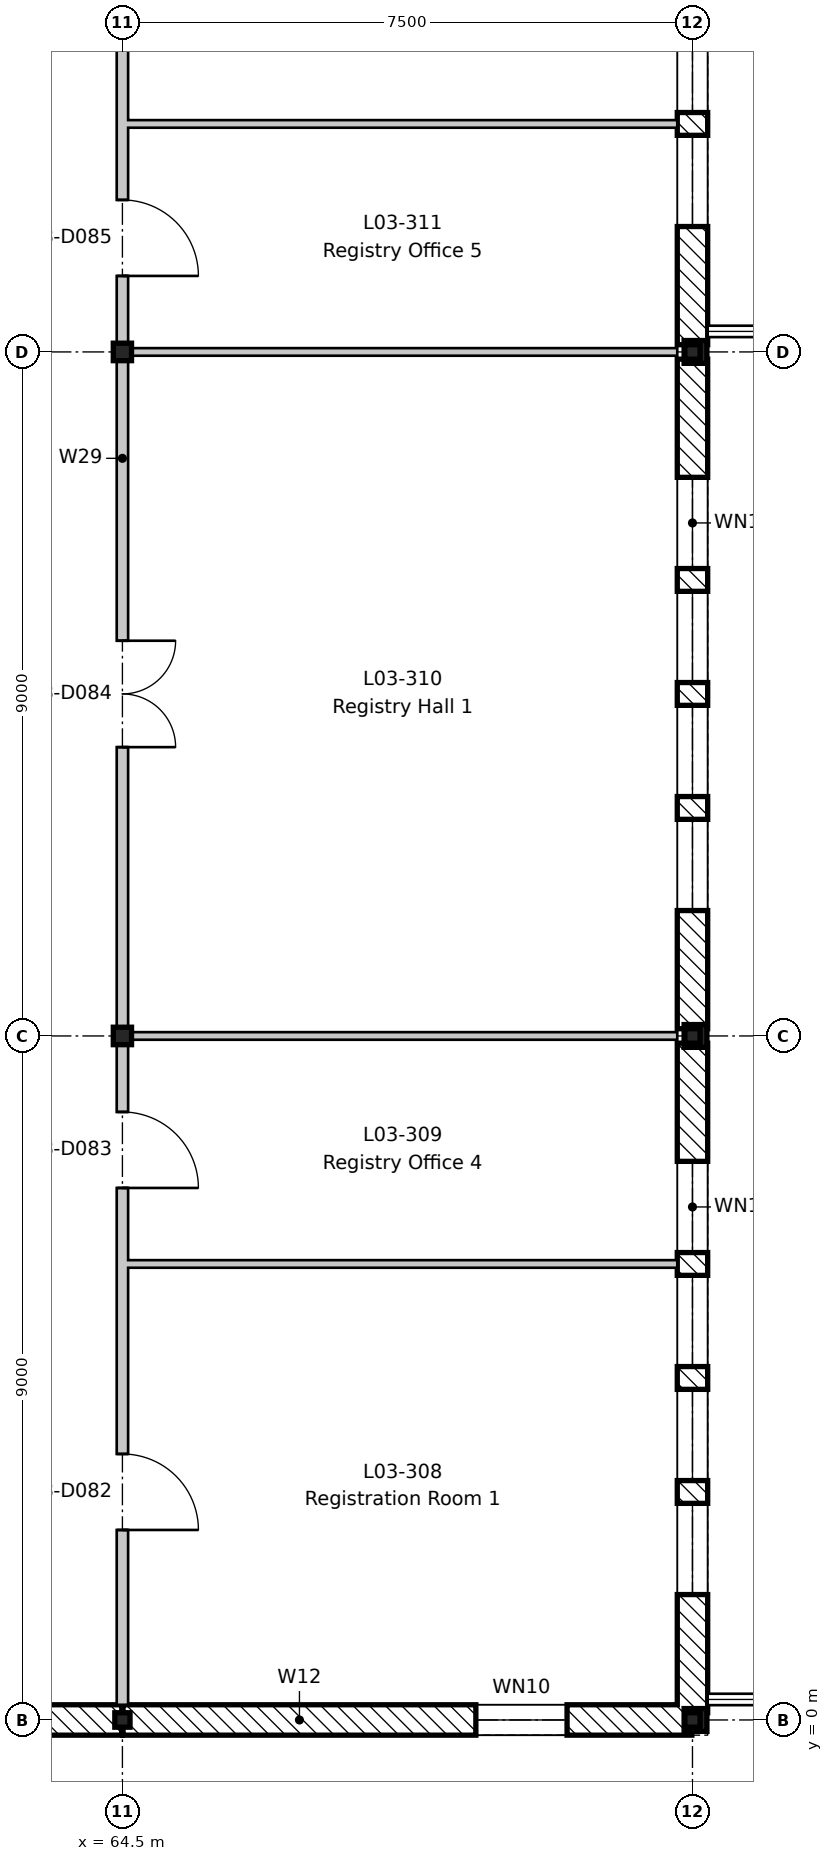
"""IFC4 building model, lengths in metres.
Left out: names, types, materials, properties, quantities, classifications, styles, units other than length and angle.
Written with IfcOpenShell. Run it as: python <this file> out.ifc"""

import sys

from ifc_helpers import new_model, si_unit, direction, frame, frame_2d, origin, origin_2d, place, context, subcontext, project, spatial, rectangle, i_section, extrude, element, fill, save


model = new_model("IFC4")
c1 = context("Model", 3, precision=1e-05, world=origin(), true_north=direction((0.0, 1.0)))
c2 = subcontext(c1, "Body", "Model", "MODEL_VIEW")
j1 = project(units=[si_unit("LENGTHUNIT", "METRE"), si_unit("PLANEANGLEUNIT", "RADIAN")], contexts=[c1])
p1 = place(None, origin())
s1 = spatial("IfcSite", under=j1, at=p1, CompositionType="ELEMENT")
p2 = place(p1, origin())
s2 = spatial("IfcBuilding", under=s1, at=p2, CompositionType="ELEMENT")
p3 = place(p2, frame((0.0, 0.0, 14.4)))
s3 = spatial("IfcBuildingStorey", under=s2, at=p3, CompositionType="ELEMENT", Elevation=14.4)
p4 = place(p3, frame((64.5, 0.0, -0.2), z_axis=(0.0, 0.0, 1.0), x_axis=(1.0, 0.0, 0.0)))
e1 = element("IfcColumn", 1, at=p4, inside=s3, PredefinedType="COLUMN", context=c2, shape_type="SweptSolid", body=[
    extrude(i_section(OverallWidth=0.2, OverallDepth=0.19, WebThickness=0.007, FlangeThickness=0.01, FilletRadius=0.018, at=origin_2d()), origin(), (0.0, 0.0, 1.0), 4.15),
])
for number, where, z_axis, x_axis in (
    (2, (64.5, 9.0, -0.2), (0.0, 0.0, 1.0), (1.0, 0.0, 0.0)),
    (3, (64.5, 18.0, -0.2), (0.0, 0.0, 1.0), (1.0, 0.0, 0.0)),
):
    element("IfcColumn", number, at=place(p3, frame(where, z_axis=z_axis, x_axis=x_axis)), inside=s3, PredefinedType="COLUMN", context=c2, shape_type="SweptSolid", body=[
        extrude(i_section(OverallWidth=0.24, OverallDepth=0.23, WebThickness=0.008, FlangeThickness=0.012, FilletRadius=0.021, at=origin_2d()), origin(), (0.0, 0.0, 1.0), 4.15),
    ])
for number, where, z_axis, x_axis in (
    (4, (72.0, 0.0, -0.2), (0.0, 0.0, 1.0), (1.0, 0.0, 0.0)),
    (5, (72.0, 9.0, -0.2), (0.0, 0.0, 1.0), (1.0, 0.0, 0.0)),
    (6, (72.0, 18.0, -0.2), (0.0, 0.0, 1.0), (1.0, 0.0, 0.0)),
):
    element("IfcColumn", number, at=place(p3, frame(where, z_axis=z_axis, x_axis=x_axis)), inside=s3, PredefinedType="COLUMN", context=c2, shape_type="SweptSolid", body=[
        extrude(i_section(OverallWidth=0.2, OverallDepth=0.19, WebThickness=0.007, FlangeThickness=0.01, FilletRadius=0.018, at=origin_2d()), origin(), (0.0, 0.0, 1.0), 4.15),
    ])
for number, where, z_axis, x_axis in (
    (7, (72.04, 0.0, 3.95), (0.0, 0.0, 1.0), (1.0, 0.0, 0.0)),
    (8, (72.04, 9.0, 3.95), (0.0, 0.0, 1.0), (1.0, 0.0, 0.0)),
    (9, (72.04, 18.0, 3.95), (0.0, 0.0, 1.0), (1.0, 0.0, 0.0)),
):
    element("IfcColumn", number, at=place(p3, frame(where, z_axis=z_axis, x_axis=x_axis)), inside=s3, PredefinedType="COLUMN", context=c2, shape_type="SweptSolid", body=[
        extrude(i_section(OverallWidth=0.3, OverallDepth=0.3, WebThickness=0.011, FlangeThickness=0.019, FilletRadius=0.027, at=origin_2d()), origin(), (0.0, 0.0, 1.0), 0.25),
    ])
p5 = place(p3, frame((72.0, 8.905, 0.0), z_axis=(0.0, 0.0, 1.0), x_axis=(0.0, -1.0, 0.0)))
e10 = element("IfcWall", 10, at=p5, inside=s3, PredefinedType="STANDARD", context=c2, shape_type="SweptSolid", body=[
    extrude(rectangle(XDim=8.81, YDim=0.4, at=frame_2d((4.405, 0.0))), origin(), (0.0, 0.0, 1.0), 3.55),
])
p6 = place(p5, frame((6.055, 0.0, 0.6)))
e11 = element("IfcOpeningElement", 11, at=p6, cuts=e10, PredefinedType="OPENING", context=c2, shape_type="SweptSolid", body=[
    extrude(rectangle(XDim=1.2, YDim=1.8, at=frame_2d((0.6, 0.9))), frame((0.0, 0.21, 0.0), z_axis=(0.0, -1.0, 0.0), x_axis=(1.0, 0.0, 0.0)), (0.0, 0.0, 1.0), 0.42),
])
p7 = place(p5, frame((4.555, 0.0, 0.6)))
e12 = element("IfcOpeningElement", 12, at=p7, cuts=e10, PredefinedType="OPENING", context=c2, shape_type="SweptSolid", body=[
    extrude(rectangle(XDim=1.2, YDim=1.8, at=frame_2d((0.6, 0.9))), frame((0.0, 0.21, 0.0), z_axis=(0.0, -1.0, 0.0), x_axis=(1.0, 0.0, 0.0)), (0.0, 0.0, 1.0), 0.42),
])
p8 = place(p5, frame((3.055, 0.0, 0.6)))
e13 = element("IfcOpeningElement", 13, at=p8, cuts=e10, PredefinedType="OPENING", context=c2, shape_type="SweptSolid", body=[
    extrude(rectangle(XDim=1.2, YDim=1.8, at=frame_2d((0.6, 0.9))), frame((0.0, 0.21, 0.0), z_axis=(0.0, -1.0, 0.0), x_axis=(1.0, 0.0, 0.0)), (0.0, 0.0, 1.0), 0.42),
])
p9 = place(p5, frame((1.555, 0.0, 0.6)))
e14 = element("IfcOpeningElement", 14, at=p9, cuts=e10, PredefinedType="OPENING", context=c2, shape_type="SweptSolid", body=[
    extrude(rectangle(XDim=1.2, YDim=1.8, at=frame_2d((0.6, 0.9))), frame((0.0, 0.21, 0.0), z_axis=(0.0, -1.0, 0.0), x_axis=(1.0, 0.0, 0.0)), (0.0, 0.0, 1.0), 0.42),
])
p10 = place(p3, frame((72.0, 17.905, 0.0), z_axis=(0.0, 0.0, 1.0), x_axis=(0.0, -1.0, 0.0)))
e15 = element("IfcWall", 15, at=p10, inside=s3, PredefinedType="STANDARD", context=c2, shape_type="SweptSolid", body=[
    extrude(rectangle(XDim=8.81, YDim=0.4, at=frame_2d((4.405, 0.0))), origin(), (0.0, 0.0, 1.0), 3.55),
])
p11 = place(p10, frame((6.055, 0.0, 0.6)))
e16 = element("IfcOpeningElement", 16, at=p11, cuts=e15, PredefinedType="OPENING", context=c2, shape_type="SweptSolid", body=[
    extrude(rectangle(XDim=1.2, YDim=1.8, at=frame_2d((0.6, 0.9))), frame((0.0, 0.21, 0.0), z_axis=(0.0, -1.0, 0.0), x_axis=(1.0, 0.0, 0.0)), (0.0, 0.0, 1.0), 0.42),
])
p12 = place(p10, frame((4.555, 0.0, 0.6)))
e17 = element("IfcOpeningElement", 17, at=p12, cuts=e15, PredefinedType="OPENING", context=c2, shape_type="SweptSolid", body=[
    extrude(rectangle(XDim=1.2, YDim=1.8, at=frame_2d((0.6, 0.9))), frame((0.0, 0.21, 0.0), z_axis=(0.0, -1.0, 0.0), x_axis=(1.0, 0.0, 0.0)), (0.0, 0.0, 1.0), 0.42),
])
p13 = place(p10, frame((3.055, 0.0, 0.6)))
e18 = element("IfcOpeningElement", 18, at=p13, cuts=e15, PredefinedType="OPENING", context=c2, shape_type="SweptSolid", body=[
    extrude(rectangle(XDim=1.2, YDim=1.8, at=frame_2d((0.6, 0.9))), frame((0.0, 0.21, 0.0), z_axis=(0.0, -1.0, 0.0), x_axis=(1.0, 0.0, 0.0)), (0.0, 0.0, 1.0), 0.42),
])
p14 = place(p10, frame((1.555, 0.0, 0.6)))
e19 = element("IfcOpeningElement", 19, at=p14, cuts=e15, PredefinedType="OPENING", context=c2, shape_type="SweptSolid", body=[
    extrude(rectangle(XDim=1.2, YDim=1.8, at=frame_2d((0.6, 0.9))), frame((0.0, 0.21, 0.0), z_axis=(0.0, -1.0, 0.0), x_axis=(1.0, 0.0, 0.0)), (0.0, 0.0, 1.0), 0.42),
])
p15 = place(p3, frame((72.0, 26.905, 0.0), z_axis=(0.0, 0.0, 1.0), x_axis=(0.0, -1.0, 0.0)))
e20 = element("IfcWall", 20, at=p15, inside=s3, PredefinedType="STANDARD", context=c2, shape_type="SweptSolid", body=[
    extrude(rectangle(XDim=8.81, YDim=0.4, at=frame_2d((4.405, 0.0))), origin(), (0.0, 0.0, 1.0), 3.55),
])
p16 = place(p15, frame((6.055, 0.0, 0.6)))
e21 = element("IfcOpeningElement", 21, at=p16, cuts=e20, PredefinedType="OPENING", context=c2, shape_type="SweptSolid", body=[
    extrude(rectangle(XDim=1.2, YDim=1.8, at=frame_2d((0.6, 0.9))), frame((0.0, 0.21, 0.0), z_axis=(0.0, -1.0, 0.0), x_axis=(1.0, 0.0, 0.0)), (0.0, 0.0, 1.0), 0.42),
])
p17 = place(p15, frame((4.555, 0.0, 0.6)))
e22 = element("IfcOpeningElement", 22, at=p17, cuts=e20, PredefinedType="OPENING", context=c2, shape_type="SweptSolid", body=[
    extrude(rectangle(XDim=1.2, YDim=1.8, at=frame_2d((0.6, 0.9))), frame((0.0, 0.21, 0.0), z_axis=(0.0, -1.0, 0.0), x_axis=(1.0, 0.0, 0.0)), (0.0, 0.0, 1.0), 0.42),
])
p18 = place(p15, frame((3.055, 0.0, 0.6)))
e23 = element("IfcOpeningElement", 23, at=p18, cuts=e20, PredefinedType="OPENING", context=c2, shape_type="SweptSolid", body=[
    extrude(rectangle(XDim=1.2, YDim=1.8, at=frame_2d((0.6, 0.9))), frame((0.0, 0.21, 0.0), z_axis=(0.0, -1.0, 0.0), x_axis=(1.0, 0.0, 0.0)), (0.0, 0.0, 1.0), 0.42),
])
p19 = place(p15, frame((1.555, 0.0, 0.6)))
e24 = element("IfcOpeningElement", 24, at=p19, cuts=e20, PredefinedType="OPENING", context=c2, shape_type="SweptSolid", body=[
    extrude(rectangle(XDim=1.2, YDim=1.8, at=frame_2d((0.6, 0.9))), frame((0.0, 0.21, 0.0), z_axis=(0.0, -1.0, 0.0), x_axis=(1.0, 0.0, 0.0)), (0.0, 0.0, 1.0), 0.42),
])
p20 = place(p3, frame((64.492, 0.0, 0.0), z_axis=(0.0, 0.0, 1.0), x_axis=(-1.0, 0.0, 0.0)))
e25 = element("IfcWall", 25, at=p20, inside=s3, PredefinedType="STANDARD", context=c2, shape_type="SweptSolid", body=[
    extrude(rectangle(XDim=2.983, YDim=0.4, at=frame_2d((1.492, 0.0))), origin(), (0.0, 0.0, 1.0), 3.75),
])
p21 = place(p3, frame((71.992, 0.0, 0.0), z_axis=(0.0, 0.0, 1.0), x_axis=(-1.0, 0.0, 0.0)))
e26 = element("IfcWall", 26, at=p21, inside=s3, PredefinedType="STANDARD", context=c2, shape_type="SweptSolid", body=[
    extrude(rectangle(XDim=7.483, YDim=0.4, at=frame_2d((3.742, 0.0))), origin(), (0.0, 0.0, 1.0), 3.62),
])
p22 = place(p21, frame((1.642, 0.0, 0.6)))
e27 = element("IfcOpeningElement", 27, at=p22, cuts=e26, PredefinedType="OPENING", context=c2, shape_type="SweptSolid", body=[
    extrude(rectangle(XDim=1.2, YDim=1.8, at=frame_2d((0.6, 0.9))), frame((0.0, 0.21, 0.0), z_axis=(0.0, -1.0, 0.0), x_axis=(1.0, 0.0, 0.0)), (0.0, 0.0, 1.0), 0.42),
])
p23 = place(p3, frame((64.575, 6.0, 0.0), z_axis=(0.0, 0.0, 1.0), x_axis=(1.0, 0.0, 0.0)))
e28 = element("IfcWall", 28, at=p23, inside=s3, PredefinedType="PARTITIONING", context=c2, shape_type="SweptSolid", body=[
    extrude(rectangle(XDim=7.225, YDim=0.1, at=frame_2d((3.613, 0.0))), origin(), (0.0, 0.0, 1.0), 3.95),
])
for number, where, z_axis, x_axis in (
    (29, (64.575, 9.0, 0.0), (0.0, 0.0, 1.0), (1.0, 0.0, 0.0)),
    (30, (64.575, 18.0, 0.0), (0.0, 0.0, 1.0), (1.0, 0.0, 0.0)),
):
    element("IfcWall", number, at=place(p3, frame(where, z_axis=z_axis, x_axis=x_axis)), inside=s3, PredefinedType="PARTITIONING", context=c2, shape_type="SweptSolid", body=[
        extrude(rectangle(XDim=7.225, YDim=0.1, at=frame_2d((3.613, 0.0))), origin(), (0.0, 0.0, 1.0), 3.6),
    ])
p24 = place(p3, frame((64.575, 21.0, 0.0), z_axis=(0.0, 0.0, 1.0), x_axis=(1.0, 0.0, 0.0)))
e31 = element("IfcWall", 31, at=p24, inside=s3, PredefinedType="PARTITIONING", context=c2, shape_type="SweptSolid", body=[
    extrude(rectangle(XDim=7.225, YDim=0.1, at=frame_2d((3.613, 0.0))), origin(), (0.0, 0.0, 1.0), 3.95),
])
p25 = place(p3, frame((64.5, 0.2, 0.0), z_axis=(0.0, 0.0, 1.0), x_axis=(0.0, 1.0, 0.0)))
e32 = element("IfcWall", 32, at=p25, inside=s3, PredefinedType="PARTITIONING", context=c2, shape_type="SweptSolid", body=[
    extrude(rectangle(XDim=53.6, YDim=0.15, at=frame_2d((26.8, 0.0))), origin(), (0.0, 0.0, 1.0), 3.43),
])
p26 = place(p25, frame((2.3, 0.0, 0.0)))
e33 = element("IfcOpeningElement", 33, at=p26, cuts=e32, PredefinedType="OPENING", context=c2, shape_type="SweptSolid", body=[
    extrude(rectangle(XDim=1.0, YDim=2.1, at=frame_2d((0.5, 1.05))), frame((0.0, 0.085, 0.0), z_axis=(0.0, -1.0, 0.0), x_axis=(1.0, 0.0, 0.0)), (0.0, 0.0, 1.0), 0.17),
])
p27 = place(p25, frame((6.8, 0.0, 0.0)))
e34 = element("IfcOpeningElement", 34, at=p27, cuts=e32, PredefinedType="OPENING", context=c2, shape_type="SweptSolid", body=[
    extrude(rectangle(XDim=1.0, YDim=2.1, at=frame_2d((0.5, 1.05))), frame((0.0, 0.085, 0.0), z_axis=(0.0, -1.0, 0.0), x_axis=(1.0, 0.0, 0.0)), (0.0, 0.0, 1.0), 0.17),
])
p28 = place(p25, frame((12.6, 0.0, 0.0)))
e35 = element("IfcOpeningElement", 35, at=p28, cuts=e32, PredefinedType="OPENING", context=c2, shape_type="SweptSolid", body=[
    extrude(rectangle(XDim=1.4, YDim=2.1, at=frame_2d((0.7, 1.05))), frame((0.0, 0.085, 0.0), z_axis=(0.0, -1.0, 0.0), x_axis=(1.0, 0.0, 0.0)), (0.0, 0.0, 1.0), 0.17),
])
p29 = place(p25, frame((18.8, 0.0, 0.0)))
e36 = element("IfcOpeningElement", 36, at=p29, cuts=e32, PredefinedType="OPENING", context=c2, shape_type="SweptSolid", body=[
    extrude(rectangle(XDim=1.0, YDim=2.1, at=frame_2d((0.5, 1.05))), frame((0.0, 0.085, 0.0), z_axis=(0.0, -1.0, 0.0), x_axis=(1.0, 0.0, 0.0)), (0.0, 0.0, 1.0), 0.17),
])
p30 = place(p25, frame((23.3, 0.0, 0.0)))
e37 = element("IfcOpeningElement", 37, at=p30, cuts=e32, PredefinedType="OPENING", context=c2, shape_type="SweptSolid", body=[
    extrude(rectangle(XDim=1.0, YDim=2.1, at=frame_2d((0.5, 1.05))), frame((0.0, 0.085, 0.0), z_axis=(0.0, -1.0, 0.0), x_axis=(1.0, 0.0, 0.0)), (0.0, 0.0, 1.0), 0.17),
])
p31 = place(p25, frame((27.8, 0.0, 0.0)))
e38 = element("IfcOpeningElement", 38, at=p31, cuts=e32, PredefinedType="OPENING", context=c2, shape_type="SweptSolid", body=[
    extrude(rectangle(XDim=1.0, YDim=2.1, at=frame_2d((0.5, 1.05))), frame((0.0, 0.085, 0.0), z_axis=(0.0, -1.0, 0.0), x_axis=(1.0, 0.0, 0.0)), (0.0, 0.0, 1.0), 0.17),
])
p32 = place(p25, frame((30.8, 0.0, 0.0)))
e39 = element("IfcOpeningElement", 39, at=p32, cuts=e32, PredefinedType="OPENING", context=c2, shape_type="SweptSolid", body=[
    extrude(rectangle(XDim=1.0, YDim=2.1, at=frame_2d((0.5, 1.05))), frame((0.0, 0.085, 0.0), z_axis=(0.0, -1.0, 0.0), x_axis=(1.0, 0.0, 0.0)), (0.0, 0.0, 1.0), 0.17),
])
p33 = place(p25, frame((33.8, 0.0, 0.0)))
e40 = element("IfcOpeningElement", 40, at=p33, cuts=e32, PredefinedType="OPENING", context=c2, shape_type="SweptSolid", body=[
    extrude(rectangle(XDim=1.0, YDim=2.1, at=frame_2d((0.5, 1.05))), frame((0.0, 0.085, 0.0), z_axis=(0.0, -1.0, 0.0), x_axis=(1.0, 0.0, 0.0)), (0.0, 0.0, 1.0), 0.17),
])
p34 = place(p25, frame((38.3, 0.0, 0.0)))
e41 = element("IfcOpeningElement", 41, at=p34, cuts=e32, PredefinedType="OPENING", context=c2, shape_type="SweptSolid", body=[
    extrude(rectangle(XDim=1.0, YDim=2.1, at=frame_2d((0.5, 1.05))), frame((0.0, 0.085, 0.0), z_axis=(0.0, -1.0, 0.0), x_axis=(1.0, 0.0, 0.0)), (0.0, 0.0, 1.0), 0.17),
])
p35 = place(p25, frame((42.8, 0.0, 0.0)))
e42 = element("IfcOpeningElement", 42, at=p35, cuts=e32, PredefinedType="OPENING", context=c2, shape_type="SweptSolid", body=[
    extrude(rectangle(XDim=1.0, YDim=2.1, at=frame_2d((0.5, 1.05))), frame((0.0, 0.085, 0.0), z_axis=(0.0, -1.0, 0.0), x_axis=(1.0, 0.0, 0.0)), (0.0, 0.0, 1.0), 0.17),
])
p36 = place(p25, frame((48.6, 0.0, 0.0)))
e43 = element("IfcOpeningElement", 43, at=p36, cuts=e32, PredefinedType="OPENING", context=c2, shape_type="SweptSolid", body=[
    extrude(rectangle(XDim=1.4, YDim=2.1, at=frame_2d((0.7, 1.05))), frame((0.0, 0.085, 0.0), z_axis=(0.0, -1.0, 0.0), x_axis=(1.0, 0.0, 0.0)), (0.0, 0.0, 1.0), 0.17),
])
p37 = place(p6, origin())
e44 = element("IfcWindow", 44, at=p37, inside=s3, PartitioningType="SINGLE_PANEL", PredefinedType="WINDOW", context=c2, shape_type="SweptSolid", body=[
    extrude(rectangle(XDim=1.2, YDim=1.8, at=frame_2d((0.6, 0.9))), frame((0.0, 0.03, 0.0), z_axis=(0.0, -1.0, 0.0), x_axis=(1.0, 0.0, 0.0)), (0.0, 0.0, 1.0), 0.06),
])
fill(e11, e44)
p38 = place(p7, origin())
e45 = element("IfcWindow", 45, at=p38, inside=s3, PartitioningType="SINGLE_PANEL", PredefinedType="WINDOW", context=c2, shape_type="SweptSolid", body=[
    extrude(rectangle(XDim=1.2, YDim=1.8, at=frame_2d((0.6, 0.9))), frame((0.0, 0.03, 0.0), z_axis=(0.0, -1.0, 0.0), x_axis=(1.0, 0.0, 0.0)), (0.0, 0.0, 1.0), 0.06),
])
fill(e12, e45)
p39 = place(p8, origin())
e46 = element("IfcWindow", 46, at=p39, inside=s3, PartitioningType="SINGLE_PANEL", PredefinedType="WINDOW", context=c2, shape_type="SweptSolid", body=[
    extrude(rectangle(XDim=1.2, YDim=1.8, at=frame_2d((0.6, 0.9))), frame((0.0, 0.03, 0.0), z_axis=(0.0, -1.0, 0.0), x_axis=(1.0, 0.0, 0.0)), (0.0, 0.0, 1.0), 0.06),
])
fill(e13, e46)
p40 = place(p9, origin())
e47 = element("IfcWindow", 47, at=p40, inside=s3, PartitioningType="SINGLE_PANEL", PredefinedType="WINDOW", context=c2, shape_type="SweptSolid", body=[
    extrude(rectangle(XDim=1.2, YDim=1.8, at=frame_2d((0.6, 0.9))), frame((0.0, 0.03, 0.0), z_axis=(0.0, -1.0, 0.0), x_axis=(1.0, 0.0, 0.0)), (0.0, 0.0, 1.0), 0.06),
])
fill(e14, e47)
p41 = place(p11, origin())
e48 = element("IfcWindow", 48, at=p41, inside=s3, PartitioningType="SINGLE_PANEL", PredefinedType="WINDOW", context=c2, shape_type="SweptSolid", body=[
    extrude(rectangle(XDim=1.2, YDim=1.8, at=frame_2d((0.6, 0.9))), frame((0.0, 0.03, 0.0), z_axis=(0.0, -1.0, 0.0), x_axis=(1.0, 0.0, 0.0)), (0.0, 0.0, 1.0), 0.06),
])
fill(e16, e48)
p42 = place(p12, origin())
e49 = element("IfcWindow", 49, at=p42, inside=s3, PartitioningType="SINGLE_PANEL", PredefinedType="WINDOW", context=c2, shape_type="SweptSolid", body=[
    extrude(rectangle(XDim=1.2, YDim=1.8, at=frame_2d((0.6, 0.9))), frame((0.0, 0.03, 0.0), z_axis=(0.0, -1.0, 0.0), x_axis=(1.0, 0.0, 0.0)), (0.0, 0.0, 1.0), 0.06),
])
fill(e17, e49)
p43 = place(p13, origin())
e50 = element("IfcWindow", 50, at=p43, inside=s3, PartitioningType="SINGLE_PANEL", PredefinedType="WINDOW", context=c2, shape_type="SweptSolid", body=[
    extrude(rectangle(XDim=1.2, YDim=1.8, at=frame_2d((0.6, 0.9))), frame((0.0, 0.03, 0.0), z_axis=(0.0, -1.0, 0.0), x_axis=(1.0, 0.0, 0.0)), (0.0, 0.0, 1.0), 0.06),
])
fill(e18, e50)
p44 = place(p14, origin())
e51 = element("IfcWindow", 51, at=p44, inside=s3, PartitioningType="SINGLE_PANEL", PredefinedType="WINDOW", context=c2, shape_type="SweptSolid", body=[
    extrude(rectangle(XDim=1.2, YDim=1.8, at=frame_2d((0.6, 0.9))), frame((0.0, 0.03, 0.0), z_axis=(0.0, -1.0, 0.0), x_axis=(1.0, 0.0, 0.0)), (0.0, 0.0, 1.0), 0.06),
])
fill(e19, e51)
p45 = place(p16, origin())
e52 = element("IfcWindow", 52, at=p45, inside=s3, PartitioningType="SINGLE_PANEL", PredefinedType="WINDOW", context=c2, shape_type="SweptSolid", body=[
    extrude(rectangle(XDim=1.2, YDim=1.8, at=frame_2d((0.6, 0.9))), frame((0.0, 0.03, 0.0), z_axis=(0.0, -1.0, 0.0), x_axis=(1.0, 0.0, 0.0)), (0.0, 0.0, 1.0), 0.06),
])
fill(e21, e52)
p46 = place(p17, origin())
e53 = element("IfcWindow", 53, at=p46, inside=s3, PartitioningType="SINGLE_PANEL", PredefinedType="WINDOW", context=c2, shape_type="SweptSolid", body=[
    extrude(rectangle(XDim=1.2, YDim=1.8, at=frame_2d((0.6, 0.9))), frame((0.0, 0.03, 0.0), z_axis=(0.0, -1.0, 0.0), x_axis=(1.0, 0.0, 0.0)), (0.0, 0.0, 1.0), 0.06),
])
fill(e22, e53)
p47 = place(p22, origin())
e54 = element("IfcWindow", 54, at=p47, inside=s3, PartitioningType="SINGLE_PANEL", PredefinedType="WINDOW", context=c2, shape_type="SweptSolid", body=[
    extrude(rectangle(XDim=1.2, YDim=1.8, at=frame_2d((0.6, 0.9))), frame((0.0, 0.03, 0.0), z_axis=(0.0, -1.0, 0.0), x_axis=(1.0, 0.0, 0.0)), (0.0, 0.0, 1.0), 0.06),
])
fill(e27, e54)
p48 = place(p26, frame((1.0, 0.0, 0.0), z_axis=(0.0, 0.0, 1.0), x_axis=(-1.0, 0.0, 0.0)))
e55 = element("IfcDoor", 55, at=p48, inside=s3, OperationType="SINGLE_SWING_RIGHT", PredefinedType="DOOR", context=c2, shape_type="SweptSolid", body=[
    extrude(rectangle(XDim=1.0, YDim=2.1, at=frame_2d((0.5, 1.05))), frame((0.0, 0.025, 0.0), z_axis=(0.0, -1.0, 0.0), x_axis=(1.0, 0.0, 0.0)), (0.0, 0.0, 1.0), 0.05),
])
fill(e33, e55)
p49 = place(p27, frame((1.0, 0.0, 0.0), z_axis=(0.0, 0.0, 1.0), x_axis=(-1.0, 0.0, 0.0)))
e56 = element("IfcDoor", 56, at=p49, inside=s3, OperationType="SINGLE_SWING_RIGHT", PredefinedType="DOOR", context=c2, shape_type="SweptSolid", body=[
    extrude(rectangle(XDim=1.0, YDim=2.1, at=frame_2d((0.5, 1.05))), frame((0.0, 0.025, 0.0), z_axis=(0.0, -1.0, 0.0), x_axis=(1.0, 0.0, 0.0)), (0.0, 0.0, 1.0), 0.05),
])
fill(e34, e56)
p50 = place(p28, frame((1.4, 0.0, 0.0), z_axis=(0.0, 0.0, 1.0), x_axis=(-1.0, 0.0, 0.0)))
e57 = element("IfcDoor", 57, at=p50, inside=s3, OperationType="DOUBLE_DOOR_SINGLE_SWING", PredefinedType="DOOR", context=c2, shape_type="SweptSolid", body=[
    extrude(rectangle(XDim=1.4, YDim=2.1, at=frame_2d((0.7, 1.05))), frame((0.0, 0.025, 0.0), z_axis=(0.0, -1.0, 0.0), x_axis=(1.0, 0.0, 0.0)), (0.0, 0.0, 1.0), 0.05),
])
fill(e35, e57)
p51 = place(p29, frame((1.0, 0.0, 0.0), z_axis=(0.0, 0.0, 1.0), x_axis=(-1.0, 0.0, 0.0)))
e58 = element("IfcDoor", 58, at=p51, inside=s3, OperationType="SINGLE_SWING_RIGHT", PredefinedType="DOOR", context=c2, shape_type="SweptSolid", body=[
    extrude(rectangle(XDim=1.0, YDim=2.1, at=frame_2d((0.5, 1.05))), frame((0.0, 0.025, 0.0), z_axis=(0.0, -1.0, 0.0), x_axis=(1.0, 0.0, 0.0)), (0.0, 0.0, 1.0), 0.05),
])
fill(e36, e58)
save(model, sys.argv[1])
